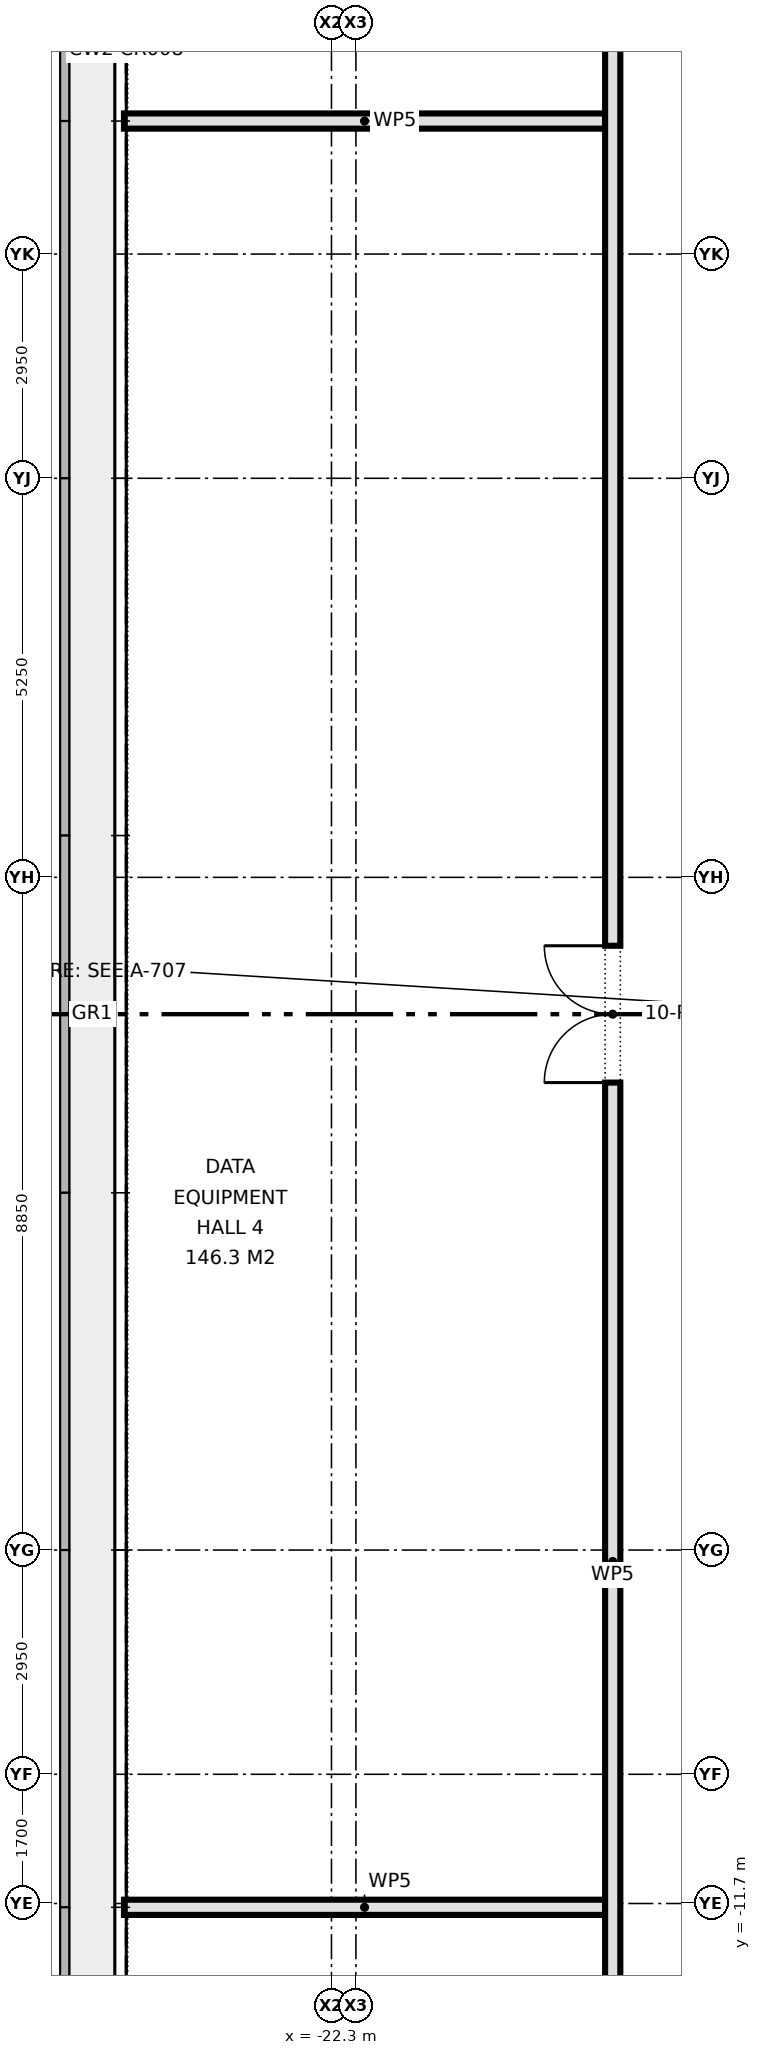
"""IFC4 building model, lengths in metres.
Left out: names, types, materials, properties, quantities, classifications, styles, units other than length and angle.
Written with IfcOpenShell. Run it as: python <this file> out.ifc"""

import sys

from ifc_helpers import new_model, si_unit, direction, frame, frame_2d, origin, place, context, subcontext, project, spatial, rectangle, extrude, element, fill, save


model = new_model("IFC4")
c1 = context("Model", 3, precision=1e-05, world=origin(), true_north=direction((0.0, 1.0)))
c2 = subcontext(c1, "Body", "Model", "MODEL_VIEW")
j1 = project(units=[si_unit("LENGTHUNIT", "METRE"), si_unit("PLANEANGLEUNIT", "RADIAN")], contexts=[c1])
p1 = place(None, origin())
s1 = spatial("IfcSite", under=j1, at=p1, CompositionType="ELEMENT")
p2 = place(p1, origin())
s2 = spatial("IfcBuilding", under=s1, at=p2, CompositionType="ELEMENT")
p3 = place(p2, frame((0.0, 0.0, 44.9)))
s3 = spatial("IfcBuildingStorey", under=s2, at=p3, CompositionType="ELEMENT", Elevation=44.9)
for number, where, z_axis, x_axis in (
    (1, (-25.03, -11.75, 0.0), (0.0, 0.0, 1.0), (1.0, 0.0, 0.0)),
    (2, (-25.03, 11.75, 0.0), (0.0, 0.0, 1.0), (1.0, 0.0, 0.0)),
):
    element("IfcWall", number, at=place(p3, frame(where, z_axis=z_axis, x_axis=x_axis)), inside=s3, PredefinedType="PARTITIONING", context=c2, shape_type="SweptSolid", body=[
        extrude(rectangle(XDim=6.33, YDim=0.2, at=frame_2d((3.165, 0.0))), origin(), (0.0, 0.0, 1.0), 4.575),
    ])
p4 = place(p3, frame((-18.6, -13.5, 0.0), z_axis=(0.0, 0.0, 1.0), x_axis=(0.0, 1.0, 0.0)))
e3 = element("IfcWall", 3, at=p4, inside=s3, PredefinedType="PARTITIONING", context=c2, shape_type="SweptSolid", body=[
    extrude(rectangle(XDim=27.0, YDim=0.2, at=frame_2d((13.5, 0.0))), origin(), (0.0, 0.0, 1.0), 4.575),
])
p5 = place(p4, frame((12.6, 0.0, 0.0)))
e4 = element("IfcOpeningElement", 4, at=p5, cuts=e3, PredefinedType="OPENING", context=c2, shape_type="SweptSolid", body=[
    extrude(rectangle(XDim=1.8, YDim=2.1, at=frame_2d((0.9, 1.05))), frame((0.0, 0.11, 0.0), z_axis=(0.0, -1.0, 0.0), x_axis=(1.0, 0.0, 0.0)), (0.0, 0.0, 1.0), 0.22),
])
p6 = place(p5, origin())
e5 = element("IfcDoor", 5, at=p6, inside=s3, OperationType="DOUBLE_DOOR_SINGLE_SWING", PredefinedType="DOOR", context=c2, shape_type="SweptSolid", body=[
    extrude(rectangle(XDim=1.8, YDim=2.1, at=frame_2d((0.9, 1.05))), frame((0.0, 0.025, 0.0), z_axis=(0.0, -1.0, 0.0), x_axis=(1.0, 0.0, 0.0)), (0.0, 0.0, 1.0), 0.05),
])
fill(e4, e5)
save(model, sys.argv[1])
